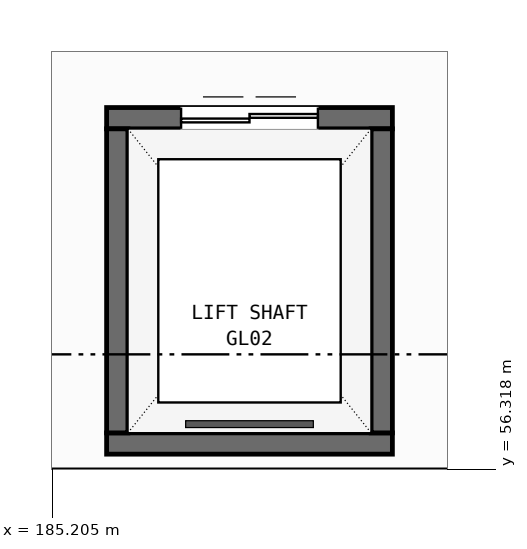
"""IFC4 building model, lengths in metres.
Left out: names, types, materials, properties, quantities, classifications, styles, units other than length and angle.
Written with IfcOpenShell. Run it as: python <this file> out.ifc"""

import sys

from ifc_helpers import new_model, si_unit, direction, frame, frame_2d, origin, place, context, subcontext, project, spatial, rectangle, extrude, element, fill, save


model = new_model("IFC4")
c1 = context("Model", 3, precision=1e-05, world=origin(), true_north=direction((0.0, 1.0)))
c2 = subcontext(c1, "Body", "Model", "MODEL_VIEW")
j1 = project(units=[si_unit("LENGTHUNIT", "METRE"), si_unit("PLANEANGLEUNIT", "RADIAN")], contexts=[c1])
p1 = place(None, origin())
s1 = spatial("IfcSite", under=j1, at=p1, CompositionType="ELEMENT")
p2 = place(p1, origin())
s2 = spatial("IfcBuilding", under=s1, at=p2, CompositionType="ELEMENT")
p3 = place(p2, frame((0.0, 0.0, -5.4)))
s3 = spatial("IfcBuildingStorey", under=s2, at=p3, CompositionType="ELEMENT", Elevation=-5.4)
p4 = place(p3, frame((185.92, 56.66, 0.0), z_axis=(0.0, 0.0, 1.0), x_axis=(1.0, 0.0, 0.0)))
e1 = element("IfcWall", 1, at=p4, inside=s3, PredefinedType="SHEAR", context=c2, shape_type="SweptSolid", body=[
    extrude(rectangle(XDim=3.76, YDim=0.28, at=frame_2d((1.88, 0.0))), origin(), (0.0, 0.0, 1.0), 5.4),
])
p5 = place(p3, frame((185.92, 60.94, 0.0), z_axis=(0.0, 0.0, 1.0), x_axis=(1.0, 0.0, 0.0)))
e2 = element("IfcWall", 2, at=p5, inside=s3, PredefinedType="SHEAR", context=c2, shape_type="SweptSolid", body=[
    extrude(rectangle(XDim=3.76, YDim=0.28, at=frame_2d((1.88, 0.0))), origin(), (0.0, 0.0, 1.0), 5.4),
])
p6 = place(p5, frame((0.98, 0.0, 0.0)))
e3 = element("IfcOpeningElement", 3, at=p6, cuts=e2, PredefinedType="OPENING", context=c2, shape_type="SweptSolid", body=[
    extrude(rectangle(XDim=1.8, YDim=2.3, at=frame_2d((0.9, 1.15))), frame((0.0, 0.15, 0.0), z_axis=(0.0, -1.0, 0.0), x_axis=(1.0, 0.0, 0.0)), (0.0, 0.0, 1.0), 0.3),
])
for number, where, z_axis, x_axis in (
    (4, (186.06, 56.8, 0.0), (0.0, 0.0, 1.0), (0.0, 1.0, 0.0)),
    (5, (189.54, 56.8, 0.0), (0.0, 0.0, 1.0), (0.0, 1.0, 0.0)),
):
    element("IfcWall", number, at=place(p3, frame(where, z_axis=z_axis, x_axis=x_axis)), inside=s3, PredefinedType="SHEAR", context=c2, shape_type="SweptSolid", body=[
        extrude(rectangle(XDim=4.0, YDim=0.28, at=frame_2d((2.0, 0.0))), origin(), (0.0, 0.0, 1.0), 5.4),
    ])
p7 = place(p6, origin())
e6 = element("IfcDoor", 6, at=p7, inside=s3, OperationType="DOUBLE_DOOR_SLIDING", PredefinedType="DOOR", context=c2, shape_type="SweptSolid", body=[
    extrude(rectangle(XDim=1.8, YDim=2.3, at=frame_2d((0.9, 1.15))), frame((0.0, 0.025, 0.0), z_axis=(0.0, -1.0, 0.0), x_axis=(1.0, 0.0, 0.0)), (0.0, 0.0, 1.0), 0.05),
])
fill(e3, e6)
save(model, sys.argv[1])
